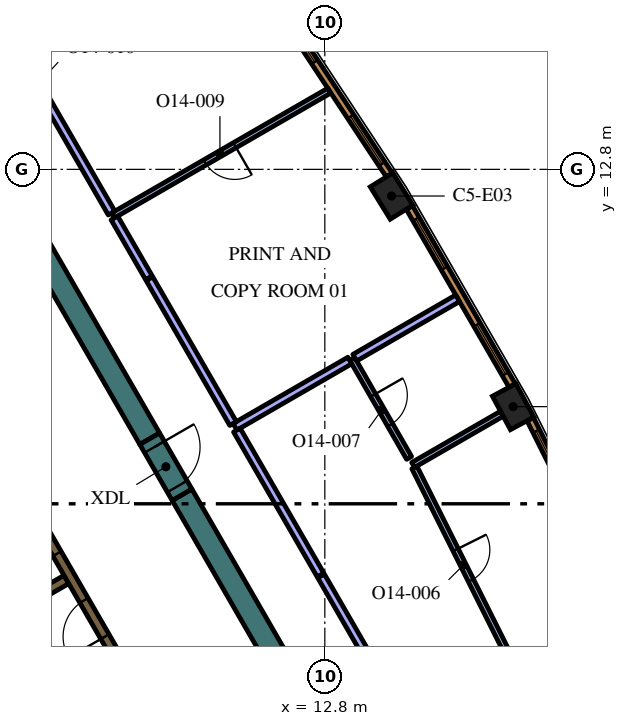
"""IFC4 building model, lengths in metres.
Left out: names, types, materials, properties, quantities, classifications, styles, units other than length and angle.
Written with IfcOpenShell. Run it as: python <this file> out.ifc"""

import sys

from ifc_helpers import new_model, si_unit, direction, frame, frame_2d, origin, origin_2d, place, context, subcontext, project, spatial, rectangle, extrude, element, fill, save


model = new_model("IFC4")
c1 = context("Model", 3, precision=1e-05, world=origin(), true_north=direction((0.0, 1.0)))
c2 = subcontext(c1, "Body", "Model", "MODEL_VIEW")
j1 = project(units=[si_unit("LENGTHUNIT", "METRE"), si_unit("PLANEANGLEUNIT", "RADIAN")], contexts=[c1])
p1 = place(None, origin())
s1 = spatial("IfcSite", under=j1, at=p1, CompositionType="ELEMENT")
p2 = place(p1, origin())
s2 = spatial("IfcBuilding", under=s1, at=p2, CompositionType="ELEMENT")
p3 = place(p2, frame((0.0, 0.0, 313.2)))
s3 = spatial("IfcBuildingStorey", under=s2, at=p3, CompositionType="ELEMENT", Elevation=313.2)
for number, where, z_axis, x_axis in (
    (1, (17.756, 6.557, 0.0), (0.0, 0.0, 1.0), (-0.474, 0.881, 0.0)),
    (2, (14.556, 12.098, 0.0), (0.0, 0.0, 1.0), (-0.526, 0.851, 0.0)),
):
    element("IfcColumn", number, at=place(p3, frame(where, z_axis=z_axis, x_axis=x_axis)), inside=s3, PredefinedType="COLUMN", context=c2, shape_type="SweptSolid", body=[
        extrude(rectangle(XDim=1.0, YDim=0.7, at=origin_2d()), origin(), (0.0, 0.0, 1.0), 4.2),
    ])
for number, where, z_axis, x_axis in (
    (3, (9.042, 4.239, 0.0), (0.0, 0.0, 1.0), (0.5, -0.866, 0.0)),
    (4, (1.989, 16.456, 0.0), (0.0, 0.0, 1.0), (0.5, -0.866, 0.0)),
):
    element("IfcWall", number, at=place(p3, frame(where, z_axis=z_axis, x_axis=x_axis)), inside=s3, PredefinedType="SOLIDWALL", context=c2, shape_type="SweptSolid", body=[
        extrude(rectangle(XDim=12.406, YDim=0.6, at=frame_2d((6.203, 0.0))), origin(), (0.0, 0.0, 1.0), 4.2),
    ])
p4 = place(p3, frame((6.568, -3.627, 0.0), z_axis=(0.0, 0.0, 1.0), x_axis=(-0.499999455981, 0.866025717874, 0.0)))
e5 = element("IfcWall", 5, at=p4, inside=s3, PredefinedType="SOLIDWALL", context=c2, shape_type="SweptSolid", body=[
    extrude(rectangle(XDim=11.978, YDim=0.25, at=frame_2d((5.989, 0.0))), origin(), (0.0, 0.0, 1.0), 4.2),
])
p5 = place(p3, frame((4.094, 0.909, 0.0), z_axis=(0.0, 0.0, 1.0), x_axis=(0.866008176907, 0.50002983664, 0.0)))
e6 = element("IfcWall", 6, at=p5, inside=s3, PredefinedType="SOLIDWALL", context=c2, shape_type="SweptSolid", body=[
    extrude(rectangle(XDim=2.2, YDim=0.25, at=frame_2d((1.1, 0.0))), origin(), (0.0, 0.0, 1.0), 4.2),
])
p6 = place(p3, frame((8.565, -2.185, 0.0), z_axis=(0.0, 0.0, 1.0), x_axis=(-0.499997954832, 0.866026584559, 0.0)))
e7 = element("IfcWall", 7, at=p6, inside=s3, PredefinedType="SOLIDWALL", context=c2, shape_type="SweptSolid", body=[
    extrude(rectangle(XDim=12.35, YDim=0.25, at=frame_2d((6.175, 0.0))), origin(), (0.0, 0.0, 1.0), 4.2),
])
p7 = place(p6, frame((0.685, 0.0, 0.0)))
e8 = element("IfcOpeningElement", 8, at=p7, cuts=e7, PredefinedType="OPENING", context=c2, shape_type="SweptSolid", body=[
    extrude(rectangle(XDim=0.9, YDim=2.1, at=frame_2d((0.45, 1.05))), frame((0.0, 0.135, 0.0), z_axis=(0.0, -1.0, 0.0), x_axis=(1.0, 0.0, 0.0)), (0.0, 0.0, 1.0), 0.27),
])
p8 = place(p6, frame((3.105, 0.0, 0.0)))
e9 = element("IfcOpeningElement", 9, at=p8, cuts=e7, PredefinedType="OPENING", context=c2, shape_type="SweptSolid", body=[
    extrude(rectangle(XDim=1.1, YDim=2.1, at=frame_2d((0.55, 1.05))), frame((0.0, 0.135, 0.0), z_axis=(0.0, -1.0, 0.0), x_axis=(1.0, 0.0, 0.0)), (0.0, 0.0, 1.0), 0.27),
])
p9 = place(p6, frame((5.625, 0.0, 0.0)))
e10 = element("IfcOpeningElement", 10, at=p9, cuts=e7, PredefinedType="OPENING", context=c2, shape_type="SweptSolid", body=[
    extrude(rectangle(XDim=1.1, YDim=2.1, at=frame_2d((0.55, 1.05))), frame((0.0, 0.135, 0.0), z_axis=(0.0, -1.0, 0.0), x_axis=(1.0, 0.0, 0.0)), (0.0, 0.0, 1.0), 0.27),
])
p10 = place(p6, frame((8.145, 0.0, 0.0)))
e11 = element("IfcOpeningElement", 11, at=p10, cuts=e7, PredefinedType="OPENING", context=c2, shape_type="SweptSolid", body=[
    extrude(rectangle(XDim=1.1, YDim=2.1, at=frame_2d((0.55, 1.05))), frame((0.0, 0.135, 0.0), z_axis=(0.0, -1.0, 0.0), x_axis=(1.0, 0.0, 0.0)), (0.0, 0.0, 1.0), 0.27),
])
p11 = place(p6, frame((10.665, 0.0, 0.0)))
e12 = element("IfcOpeningElement", 12, at=p11, cuts=e7, PredefinedType="OPENING", context=c2, shape_type="SweptSolid", body=[
    extrude(rectangle(XDim=1.1, YDim=2.1, at=frame_2d((0.55, 1.05))), frame((0.0, 0.135, 0.0), z_axis=(0.0, -1.0, 0.0), x_axis=(1.0, 0.0, 0.0)), (0.0, 0.0, 1.0), 0.27),
])
p12 = place(p3, frame((8.192, 5.711, 0.0), z_axis=(0.0, 0.0, 1.0), x_axis=(0.500062241894, -0.865989465428, 0.0)))
e13 = element("IfcWall", 13, at=p12, inside=s3, PredefinedType="SOLIDWALL", context=c2, shape_type="SweptSolid", body=[
    extrude(rectangle(XDim=1.7, YDim=0.6, at=frame_2d((0.85, 0.0))), origin(), (0.0, 0.0, 1.0), 4.2),
])
p13 = place(p12, frame((0.25, 0.0, 0.0)))
e14 = element("IfcOpeningElement", 14, at=p13, cuts=e13, PredefinedType="OPENING", context=c2, shape_type="SweptSolid", body=[
    extrude(rectangle(XDim=1.2, YDim=2.1, at=frame_2d((0.6, 1.05))), frame((0.0, 0.31, 0.0), z_axis=(0.0, -1.0, 0.0), x_axis=(1.0, 0.0, 0.0)), (0.0, 0.0, 1.0), 0.62),
])
p14 = place(p3, frame((15.124, 5.022, 0.0), z_axis=(0.0, 0.0, 1.0), x_axis=(0.866010629317, 0.500025589255, 0.0)))
e15 = element("IfcWall", 15, at=p14, inside=s3, PredefinedType="PARTITIONING", context=c2, shape_type="SweptSolid", body=[
    extrude(rectangle(XDim=2.696, YDim=0.15, at=frame_2d((1.348, 0.0))), origin(), (0.0, 0.0, 1.0), 3.55),
])
p15 = place(p3, frame((15.158, 4.955, 0.0), z_axis=(0.0, 0.0, 1.0), x_axis=(0.447465104013, -0.894301392535, 0.0)))
e16 = element("IfcWall", 16, at=p15, inside=s3, PredefinedType="PARTITIONING", context=c2, shape_type="SweptSolid", body=[
    extrude(rectangle(XDim=5.824, YDim=0.15, at=frame_2d((2.912, 0.0))), origin(), (0.0, 0.0, 1.0), 3.55),
])
p16 = place(p15, frame((2.424, 0.0, 0.0)))
e17 = element("IfcOpeningElement", 17, at=p16, cuts=e16, PredefinedType="OPENING", context=c2, shape_type="SweptSolid", body=[
    extrude(rectangle(XDim=0.9, YDim=2.1, at=frame_2d((0.45, 1.05))), frame((0.0, 0.085, 0.0), z_axis=(0.0, -1.0, 0.0), x_axis=(1.0, 0.0, 0.0)), (0.0, 0.0, 1.0), 0.17),
])
p17 = place(p3, frame((13.523, 7.808, 0.0), z_axis=(0.0, 0.0, 1.0), x_axis=(0.498338040698, -0.866982812513, 0.0)))
e18 = element("IfcWall", 18, at=p17, inside=s3, PredefinedType="PARTITIONING", context=c2, shape_type="SweptSolid", body=[
    extrude(rectangle(XDim=2.999, YDim=0.15, at=frame_2d((1.5, 0.0))), origin(), (0.0, 0.0, 1.0), 3.55),
])
p18 = place(p17, frame((1.099, 0.0, 0.0)))
e19 = element("IfcOpeningElement", 19, at=p18, cuts=e18, PredefinedType="OPENING", context=c2, shape_type="SweptSolid", body=[
    extrude(rectangle(XDim=0.9, YDim=2.1, at=frame_2d((0.45, 1.05))), frame((0.0, 0.085, 0.0), z_axis=(0.0, -1.0, 0.0), x_axis=(1.0, 0.0, 0.0)), (0.0, 0.0, 1.0), 0.17),
])
p19 = place(p3, frame((13.588, 7.845, 0.0), z_axis=(0.0, 0.0, 1.0), x_axis=(0.866022959057, 0.500004234368, 0.0)))
e20 = element("IfcWall", 20, at=p19, inside=s3, PredefinedType="PARTITIONING", context=c2, shape_type="SweptSolid", body=[
    extrude(rectangle(XDim=3.125, YDim=0.2, at=frame_2d((1.562, 0.0))), origin(), (0.0, 0.0, 1.0), 3.55),
])
p20 = place(p3, frame((10.436, 6.025, 0.0), z_axis=(0.0, 0.0, 1.0), x_axis=(0.866030664334, 0.49999088835, 0.0)))
e21 = element("IfcWall", 21, at=p20, inside=s3, PredefinedType="PARTITIONING", context=c2, shape_type="SweptSolid", body=[
    extrude(rectangle(XDim=3.49, YDim=0.2, at=frame_2d((1.745, 0.0))), origin(), (0.0, 0.0, 1.0), 3.55),
])
p21 = place(p3, frame((12.686, 2.128, 0.0), z_axis=(0.0, 0.0, 1.0), x_axis=(-0.499988222896, 0.866032203192, 0.0)))
e22 = element("IfcWall", 22, at=p21, inside=s3, PredefinedType="PARTITIONING", context=c2, shape_type="SweptSolid", body=[
    extrude(rectangle(XDim=4.4, YDim=0.2, at=frame_2d((2.2, 0.0))), origin(), (0.0, 0.0, 1.0), 3.55),
])
p22 = place(p3, frame((17.565, -6.324, 0.0), z_axis=(0.0, 0.0, 1.0), x_axis=(-0.499990354792, 0.866030972376, 0.0)))
e23 = element("IfcWall", 23, at=p22, inside=s3, PredefinedType="PARTITIONING", context=c2, shape_type="SweptSolid", body=[
    extrude(rectangle(XDim=9.729, YDim=0.2, at=frame_2d((4.865, 0.0))), origin(), (0.0, 0.0, 1.0), 3.55),
])
p23 = place(p22, frame((4.4, 0.0, 0.0)))
e24 = element("IfcOpeningElement", 24, at=p23, cuts=e23, PredefinedType="OPENING", context=c2, shape_type="SweptSolid", body=[
    extrude(rectangle(XDim=1.0, YDim=2.1, at=frame_2d((0.5, 1.05))), frame((0.0, 0.11, 0.0), z_axis=(0.0, -1.0, 0.0), x_axis=(1.0, 0.0, 0.0)), (0.0, 0.0, 1.0), 0.22),
])
p24 = place(p3, frame((12.918, 14.872, 0.0), z_axis=(0.0, 0.0, 1.0), x_axis=(-0.866033427365, -0.499986102494, 0.0)))
e25 = element("IfcWall", 25, at=p24, inside=s3, PredefinedType="PARTITIONING", context=c2, shape_type="SweptSolid", body=[
    extrude(rectangle(XDim=6.573, YDim=0.15, at=frame_2d((3.287, 0.0))), origin(), (0.0, 0.0, 1.0), 3.55),
])
p25 = place(p24, frame((2.873, 0.0, 0.0)))
e26 = element("IfcOpeningElement", 26, at=p25, cuts=e25, PredefinedType="OPENING", context=c2, shape_type="SweptSolid", body=[
    extrude(rectangle(XDim=0.9, YDim=2.1, at=frame_2d((0.45, 1.05))), frame((0.0, 0.085, 0.0), z_axis=(0.0, -1.0, 0.0), x_axis=(1.0, 0.0, 0.0)), (0.0, 0.0, 1.0), 0.17),
])
p26 = place(p3, frame((10.385, 6.112, 0.0), z_axis=(0.0, 0.0, 1.0), x_axis=(-0.499988222896, 0.866032203192, 0.0)))
e27 = element("IfcWall", 27, at=p26, inside=s3, PredefinedType="PARTITIONING", context=c2, shape_type="SweptSolid", body=[
    extrude(rectangle(XDim=4.4, YDim=0.2, at=frame_2d((2.2, 0.0))), origin(), (0.0, 0.0, 1.0), 3.55),
])
p27 = place(p3, frame((8.171, 9.948, 0.0), z_axis=(0.0, 0.0, 1.0), x_axis=(-0.500044545065, 0.865999684151, 0.0)))
e28 = element("IfcWall", 28, at=p27, inside=s3, PredefinedType="PARTITIONING", context=c2, shape_type="SweptSolid", body=[
    extrude(rectangle(XDim=1.815, YDim=0.2, at=frame_2d((0.908, 0.0))), origin(), (0.0, 0.0, 1.0), 3.55),
])
p28 = place(p3, frame((7.188, 11.65, 0.0), z_axis=(0.0, 0.0, 1.0), x_axis=(-0.499986368499, 0.866033273792, 0.0)))
e29 = element("IfcWall", 29, at=p28, inside=s3, PredefinedType="PARTITIONING", context=c2, shape_type="SweptSolid", body=[
    extrude(rectangle(XDim=7.794, YDim=0.2, at=frame_2d((3.897, 0.0))), origin(), (0.0, 0.0, 1.0), 3.55),
])
p29 = place(p28, frame((3.4, 0.0, 0.0)))
e30 = element("IfcOpeningElement", 30, at=p29, cuts=e29, PredefinedType="OPENING", context=c2, shape_type="SweptSolid", body=[
    extrude(rectangle(XDim=1.0, YDim=2.1, at=frame_2d((0.5, 1.05))), frame((0.0, 0.11, 0.0), z_axis=(0.0, -1.0, 0.0), x_axis=(1.0, 0.0, 0.0)), (0.0, 0.0, 1.0), 0.22),
])
p30 = place(p3, frame((20.625, 1.392, 0.0), z_axis=(0.0, 0.0, 1.0), x_axis=(-0.447484531401, 0.894291671747, 0.0)))
e31 = element("IfcWall", 31, at=p30, inside=s3, PredefinedType="SOLIDWALL", context=c2, shape_type="SweptSolid", body=[
    extrude(rectangle(XDim=5.406, YDim=0.19, at=frame_2d((2.703, 0.0))), origin(), (0.0, 0.0, 1.0), 3.95),
])
p31 = place(p30, frame((0.346, 0.0, 0.6)))
e32 = element("IfcOpeningElement", 32, at=p31, cuts=e31, PredefinedType="OPENING", context=c2, shape_type="SweptSolid", body=[
    extrude(rectangle(XDim=1.5, YDim=2.85, at=frame_2d((0.75, 1.425))), frame((0.0, 0.105, 0.0), z_axis=(0.0, -1.0, 0.0), x_axis=(1.0, 0.0, 0.0)), (0.0, 0.0, 1.0), 0.21),
])
p32 = place(p30, frame((3.559, 0.0, 0.6)))
e33 = element("IfcOpeningElement", 33, at=p32, cuts=e31, PredefinedType="OPENING", context=c2, shape_type="SweptSolid", body=[
    extrude(rectangle(XDim=1.5, YDim=2.85, at=frame_2d((0.75, 1.425))), frame((0.0, 0.105, 0.0), z_axis=(0.0, -1.0, 0.0), x_axis=(1.0, 0.0, 0.0)), (0.0, 0.0, 1.0), 0.21),
])
p33 = place(p3, frame((17.728, 7.114, 0.0), z_axis=(0.0, 0.0, 1.0), x_axis=(-0.500024767483, 0.866011103799, 0.0)))
e34 = element("IfcWall", 34, at=p33, inside=s3, PredefinedType="SOLIDWALL", context=c2, shape_type="SweptSolid", body=[
    extrude(rectangle(XDim=5.406, YDim=0.19, at=frame_2d((2.703, 0.0))), origin(), (0.0, 0.0, 1.0), 3.95),
])
p34 = place(p33, frame((0.346, 0.0, 0.6)))
e35 = element("IfcOpeningElement", 35, at=p34, cuts=e34, PredefinedType="OPENING", context=c2, shape_type="SweptSolid", body=[
    extrude(rectangle(XDim=1.5, YDim=2.85, at=frame_2d((0.75, 1.425))), frame((0.0, 0.105, 0.0), z_axis=(0.0, -1.0, 0.0), x_axis=(1.0, 0.0, 0.0)), (0.0, 0.0, 1.0), 0.21),
])
p35 = place(p33, frame((3.56, 0.0, 0.6)))
e36 = element("IfcOpeningElement", 36, at=p35, cuts=e34, PredefinedType="OPENING", context=c2, shape_type="SweptSolid", body=[
    extrude(rectangle(XDim=1.5, YDim=2.85, at=frame_2d((0.75, 1.425))), frame((0.0, 0.105, 0.0), z_axis=(0.0, -1.0, 0.0), x_axis=(1.0, 0.0, 0.0)), (0.0, 0.0, 1.0), 0.21),
])
p36 = place(p3, frame((14.496, 12.653, 0.0), z_axis=(0.0, 0.0, 1.0), x_axis=(-0.550744054781, 0.83467417962, 0.0)))
e37 = element("IfcWall", 37, at=p36, inside=s3, PredefinedType="SOLIDWALL", context=c2, shape_type="SweptSolid", body=[
    extrude(rectangle(XDim=5.406, YDim=0.19, at=frame_2d((2.703, 0.0))), origin(), (0.0, 0.0, 1.0), 3.95),
])
p37 = place(p36, frame((0.346, 0.0, 0.6)))
e38 = element("IfcOpeningElement", 38, at=p37, cuts=e37, PredefinedType="OPENING", context=c2, shape_type="SweptSolid", body=[
    extrude(rectangle(XDim=1.5, YDim=2.85, at=frame_2d((0.75, 1.425))), frame((0.0, 0.105, 0.0), z_axis=(0.0, -1.0, 0.0), x_axis=(1.0, 0.0, 0.0)), (0.0, 0.0, 1.0), 0.21),
])
p38 = place(p36, frame((3.559, 0.0, 0.6)))
e39 = element("IfcOpeningElement", 39, at=p38, cuts=e37, PredefinedType="OPENING", context=c2, shape_type="SweptSolid", body=[
    extrude(rectangle(XDim=1.5, YDim=2.85, at=frame_2d((0.75, 1.425))), frame((0.0, 0.105, 0.0), z_axis=(0.0, -1.0, 0.0), x_axis=(1.0, 0.0, 0.0)), (0.0, 0.0, 1.0), 0.21),
])
p39 = place(p8, origin())
e40 = element("IfcDoor", 40, at=p39, inside=s3, OperationType="DOUBLE_DOOR_SLIDING", PredefinedType="DOOR", context=c2, shape_type="SweptSolid", body=[
    extrude(rectangle(XDim=1.1, YDim=2.1, at=frame_2d((0.55, 1.05))), frame((0.0, 0.025, 0.0), z_axis=(0.0, -1.0, 0.0), x_axis=(1.0, 0.0, 0.0)), (0.0, 0.0, 1.0), 0.05),
])
fill(e9, e40)
p40 = place(p9, origin())
e41 = element("IfcDoor", 41, at=p40, inside=s3, OperationType="DOUBLE_DOOR_SLIDING", PredefinedType="DOOR", context=c2, shape_type="SweptSolid", body=[
    extrude(rectangle(XDim=1.1, YDim=2.1, at=frame_2d((0.55, 1.05))), frame((0.0, 0.025, 0.0), z_axis=(0.0, -1.0, 0.0), x_axis=(1.0, 0.0, 0.0)), (0.0, 0.0, 1.0), 0.05),
])
fill(e10, e41)
p41 = place(p13, origin())
e42 = element("IfcDoor", 42, at=p41, inside=s3, OperationType="SINGLE_SWING_LEFT", PredefinedType="DOOR", context=c2, shape_type="SweptSolid", body=[
    extrude(rectangle(XDim=1.2, YDim=2.1, at=frame_2d((0.6, 1.05))), frame((0.0, 0.025, 0.0), z_axis=(0.0, -1.0, 0.0), x_axis=(1.0, 0.0, 0.0)), (0.0, 0.0, 1.0), 0.05),
])
fill(e14, e42)
p42 = place(p16, origin())
e43 = element("IfcDoor", 43, at=p42, inside=s3, OperationType="SINGLE_SWING_LEFT", PredefinedType="DOOR", context=c2, shape_type="SweptSolid", body=[
    extrude(rectangle(XDim=0.9, YDim=2.1, at=frame_2d((0.45, 1.05))), frame((0.0, 0.025, 0.0), z_axis=(0.0, -1.0, 0.0), x_axis=(1.0, 0.0, 0.0)), (0.0, 0.0, 1.0), 0.05),
])
fill(e17, e43)
p43 = place(p18, origin())
e44 = element("IfcDoor", 44, at=p43, inside=s3, OperationType="SINGLE_SWING_RIGHT", PredefinedType="DOOR", context=c2, shape_type="SweptSolid", body=[
    extrude(rectangle(XDim=0.9, YDim=2.1, at=frame_2d((0.45, 1.05))), frame((0.0, 0.025, 0.0), z_axis=(0.0, -1.0, 0.0), x_axis=(1.0, 0.0, 0.0)), (0.0, 0.0, 1.0), 0.05),
])
fill(e19, e44)
p44 = place(p25, origin())
e45 = element("IfcDoor", 45, at=p44, inside=s3, OperationType="SINGLE_SWING_RIGHT", PredefinedType="DOOR", context=c2, shape_type="SweptSolid", body=[
    extrude(rectangle(XDim=0.9, YDim=2.1, at=frame_2d((0.45, 1.05))), frame((0.0, 0.025, 0.0), z_axis=(0.0, -1.0, 0.0), x_axis=(1.0, 0.0, 0.0)), (0.0, 0.0, 1.0), 0.05),
])
fill(e26, e45)
p45 = place(p32, origin())
e46 = element("IfcWindow", 46, at=p45, inside=s3, PartitioningType="SINGLE_PANEL", PredefinedType="WINDOW", context=c2, shape_type="SweptSolid", body=[
    extrude(rectangle(XDim=1.5, YDim=2.85, at=frame_2d((0.75, 1.425))), frame((0.0, 0.045, 0.0), z_axis=(0.0, -1.0, 0.0), x_axis=(1.0, 0.0, 0.0)), (0.0, 0.0, 1.0), 0.06),
])
fill(e33, e46)
p46 = place(p34, origin())
e47 = element("IfcWindow", 47, at=p46, inside=s3, PartitioningType="SINGLE_PANEL", PredefinedType="WINDOW", context=c2, shape_type="SweptSolid", body=[
    extrude(rectangle(XDim=1.5, YDim=2.85, at=frame_2d((0.75, 1.425))), frame((0.0, 0.045, 0.0), z_axis=(0.0, -1.0, 0.0), x_axis=(1.0, 0.0, 0.0)), (0.0, 0.0, 1.0), 0.06),
])
fill(e35, e47)
p47 = place(p35, origin())
e48 = element("IfcWindow", 48, at=p47, inside=s3, PartitioningType="SINGLE_PANEL", PredefinedType="WINDOW", context=c2, shape_type="SweptSolid", body=[
    extrude(rectangle(XDim=1.5, YDim=2.85, at=frame_2d((0.75, 1.425))), frame((0.0, 0.045, 0.0), z_axis=(0.0, -1.0, 0.0), x_axis=(1.0, 0.0, 0.0)), (0.0, 0.0, 1.0), 0.06),
])
fill(e36, e48)
p48 = place(p37, origin())
e49 = element("IfcWindow", 49, at=p48, inside=s3, PartitioningType="SINGLE_PANEL", PredefinedType="WINDOW", context=c2, shape_type="SweptSolid", body=[
    extrude(rectangle(XDim=1.5, YDim=2.85, at=frame_2d((0.75, 1.425))), frame((0.0, 0.045, 0.0), z_axis=(0.0, -1.0, 0.0), x_axis=(1.0, 0.0, 0.0)), (0.0, 0.0, 1.0), 0.06),
])
fill(e38, e49)
p49 = place(p38, origin())
e50 = element("IfcWindow", 50, at=p49, inside=s3, PartitioningType="SINGLE_PANEL", PredefinedType="WINDOW", context=c2, shape_type="SweptSolid", body=[
    extrude(rectangle(XDim=1.5, YDim=2.85, at=frame_2d((0.75, 1.425))), frame((0.0, 0.045, 0.0), z_axis=(0.0, -1.0, 0.0), x_axis=(1.0, 0.0, 0.0)), (0.0, 0.0, 1.0), 0.06),
])
fill(e39, e50)
save(model, sys.argv[1])
